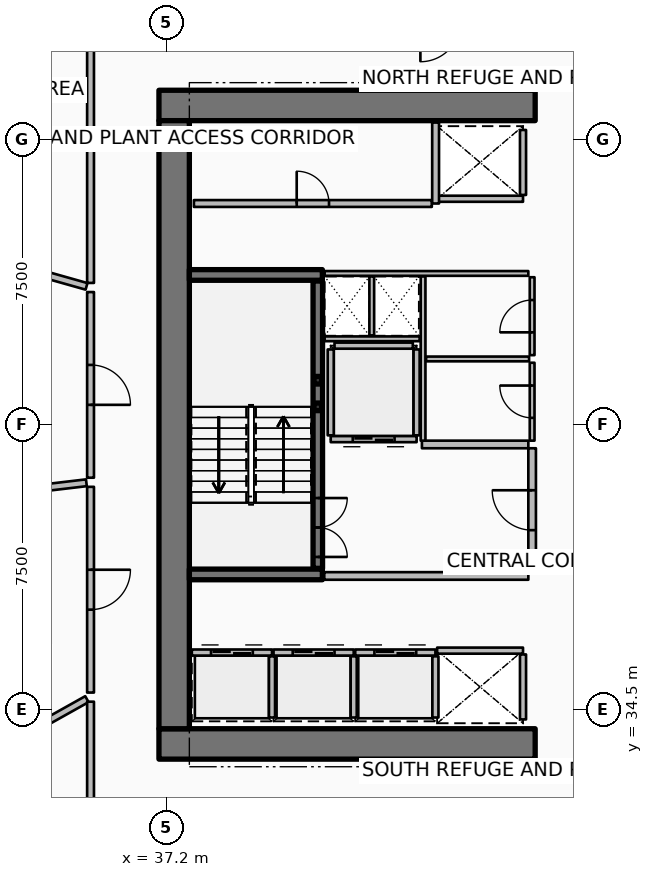
"""IFC4 building model, lengths in metres.
Left out: names, types, materials, properties, quantities, classifications, styles, units other than length and angle.
Written with IfcOpenShell. Run it as: python <this file> out.ifc"""

import sys

from ifc_helpers import new_model, si_unit, direction, frame, frame_2d, origin, origin_2d, place, context, subcontext, project, spatial, rectangle, hollow_rectangle, extrude, element, fill, save


model = new_model("IFC4")
c1 = context("Model", 3, precision=1e-05, world=origin(), true_north=direction((0.0, 1.0)))
c2 = subcontext(c1, "Body", "Model", "MODEL_VIEW")
j1 = project(units=[si_unit("LENGTHUNIT", "METRE"), si_unit("PLANEANGLEUNIT", "RADIAN")], contexts=[c1])
p1 = place(None, origin())
s1 = spatial("IfcSite", under=j1, at=p1, CompositionType="ELEMENT")
p2 = place(p1, origin())
s2 = spatial("IfcBuilding", under=s1, at=p2, CompositionType="ELEMENT")
p3 = place(p2, frame((0.0, 0.0, 116.4)))
s3 = spatial("IfcBuildingStorey", under=s2, at=p3, CompositionType="ELEMENT", Elevation=116.4)
for number, where, z_axis, x_axis in (
    (1, (37.0, 33.6, 0.0), (0.0, 0.0, 1.0), (1.0, 0.0, 0.0)),
    (2, (37.0, 50.4, 0.0), (0.0, 0.0, 1.0), (1.0, 0.0, 0.0)),
):
    element("IfcWall", number, at=place(p3, frame(where, z_axis=z_axis, x_axis=x_axis)), inside=s3, PredefinedType="SHEAR", context=c2, shape_type="SweptSolid", body=[
        extrude(rectangle(XDim=9.9, YDim=0.8, at=frame_2d((4.95, 0.0))), origin(), (0.0, 0.0, 1.0), 6.6),
    ])
p4 = place(p3, frame((37.4, 34.0, 0.0), z_axis=(0.0, 0.0, 1.0), x_axis=(0.0, 1.0, 0.0)))
e3 = element("IfcWall", 3, at=p4, inside=s3, PredefinedType="SHEAR", context=c2, shape_type="SweptSolid", body=[
    extrude(rectangle(XDim=16.0, YDim=0.8, at=frame_2d((8.0, 0.0))), origin(), (0.0, 0.0, 1.0), 6.6),
])
for number, where, z_axis, x_axis in (
    (4, (37.8, 38.06, 0.0), (0.0, 0.0, 1.0), (1.0, 0.0, 0.0)),
    (5, (37.8, 45.94, 0.0), (0.0, 0.0, 1.0), (1.0, 0.0, 0.0)),
):
    element("IfcWall", number, at=place(p3, frame(where, z_axis=z_axis, x_axis=x_axis)), inside=s3, PredefinedType="SHEAR", context=c2, shape_type="SweptSolid", body=[
        extrude(rectangle(XDim=3.5, YDim=0.28, at=frame_2d((1.75, 0.0))), origin(), (0.0, 0.0, 1.0), 6.6),
    ])
p5 = place(p3, frame((41.18, 42.47, 0.0), z_axis=(0.0, 0.0, 1.0), x_axis=(1.0, 0.0, 0.0)))
e6 = element("IfcColumn", 6, at=p5, inside=s3, PredefinedType="COLUMN", context=c2, shape_type="SweptSolid", body=[
    extrude(hollow_rectangle(XDim=0.2, YDim=0.2, WallThickness=0.01, InnerFilletRadius=0.01, OuterFilletRadius=0.02, at=origin_2d()), origin(), (0.0, 0.0, 1.0), 1.445),
])
p6 = place(p3, frame((41.18, 43.17, 0.0), z_axis=(0.0, 0.0, 1.0), x_axis=(1.0, 0.0, 0.0)))
e7 = element("IfcColumn", 7, at=p6, inside=s3, PredefinedType="COLUMN", context=c2, shape_type="SweptSolid", body=[
    extrude(hollow_rectangle(XDim=0.2, YDim=0.2, WallThickness=0.01, InnerFilletRadius=0.01, OuterFilletRadius=0.02, at=origin_2d()), origin(), (0.0, 0.0, 1.0), 4.745),
])
p7 = place(p3, frame((41.18, 38.22, 0.0), z_axis=(0.0, 0.0, 1.0), x_axis=(0.0, 1.0, 0.0)))
e8 = element("IfcWall", 8, at=p7, inside=s3, PredefinedType="SOLIDWALL", context=c2, shape_type="SweptSolid", body=[
    extrude(rectangle(XDim=7.56, YDim=0.25, at=frame_2d((3.78, 0.0))), origin(), (0.0, 0.0, 1.0), 6.28),
])
p8 = place(p7, frame((0.3, 0.0, 0.0)))
e9 = element("IfcOpeningElement", 9, at=p8, cuts=e8, PredefinedType="OPENING", context=c2, shape_type="SweptSolid", body=[
    extrude(rectangle(XDim=1.55, YDim=2.15, at=frame_2d((0.775, 1.075))), frame((0.0, 0.135, 0.0), z_axis=(0.0, -1.0, 0.0), x_axis=(1.0, 0.0, 0.0)), (0.0, 0.0, 1.0), 0.27),
])
p9 = place(p3, frame((37.865, 36.005, 0.0), z_axis=(0.0, 0.0, 1.0), x_axis=(1.0, 0.0, 0.0)))
e10 = element("IfcWall", 10, at=p9, inside=s3, PredefinedType="PARTITIONING", context=c2, shape_type="SweptSolid", body=[
    extrude(rectangle(XDim=2.11, YDim=0.16, at=frame_2d((1.055, 0.0))), origin(), (0.0, 0.0, 1.0), 6.28),
])
p10 = place(p9, frame((0.505, 0.0, 0.0)))
e11 = element("IfcOpeningElement", 11, at=p10, cuts=e10, PredefinedType="OPENING", context=c2, shape_type="SweptSolid", body=[
    extrude(rectangle(XDim=1.1, YDim=2.1, at=frame_2d((0.55, 1.05))), frame((0.0, 0.09, 0.0), z_axis=(0.0, -1.0, 0.0), x_axis=(1.0, 0.0, 0.0)), (0.0, 0.0, 1.0), 0.18),
])
p11 = place(p3, frame((39.975, 34.295, 0.0), z_axis=(0.0, 0.0, 1.0), x_axis=(0.0, 1.0, 0.0)))
e12 = element("IfcWall", 12, at=p11, inside=s3, PredefinedType="PARTITIONING", context=c2, shape_type="SweptSolid", body=[
    extrude(rectangle(XDim=1.61, YDim=0.16, at=frame_2d((0.805, 0.0))), origin(), (0.0, 0.0, 1.0), 6.28),
])
p12 = place(p3, frame((40.015, 36.005, 0.0), z_axis=(0.0, 0.0, 1.0), x_axis=(1.0, 0.0, 0.0)))
e13 = element("IfcWall", 13, at=p12, inside=s3, PredefinedType="PARTITIONING", context=c2, shape_type="SweptSolid", body=[
    extrude(rectangle(XDim=2.11, YDim=0.16, at=frame_2d((1.055, 0.0))), origin(), (0.0, 0.0, 1.0), 6.28),
])
p13 = place(p12, frame((0.505, 0.0, 0.0)))
e14 = element("IfcOpeningElement", 14, at=p13, cuts=e13, PredefinedType="OPENING", context=c2, shape_type="SweptSolid", body=[
    extrude(rectangle(XDim=1.1, YDim=2.1, at=frame_2d((0.55, 1.05))), frame((0.0, 0.09, 0.0), z_axis=(0.0, -1.0, 0.0), x_axis=(1.0, 0.0, 0.0)), (0.0, 0.0, 1.0), 0.18),
])
p14 = place(p3, frame((42.125, 34.295, 0.0), z_axis=(0.0, 0.0, 1.0), x_axis=(0.0, 1.0, 0.0)))
e15 = element("IfcWall", 15, at=p14, inside=s3, PredefinedType="PARTITIONING", context=c2, shape_type="SweptSolid", body=[
    extrude(rectangle(XDim=1.61, YDim=0.16, at=frame_2d((0.805, 0.0))), origin(), (0.0, 0.0, 1.0), 6.28),
])
p15 = place(p3, frame((42.165, 36.005, 0.0), z_axis=(0.0, 0.0, 1.0), x_axis=(1.0, 0.0, 0.0)))
e16 = element("IfcWall", 16, at=p15, inside=s3, PredefinedType="PARTITIONING", context=c2, shape_type="SweptSolid", body=[
    extrude(rectangle(XDim=2.11, YDim=0.16, at=frame_2d((1.055, 0.0))), origin(), (0.0, 0.0, 1.0), 6.28),
])
p16 = place(p15, frame((0.505, 0.0, 0.0)))
e17 = element("IfcOpeningElement", 17, at=p16, cuts=e16, PredefinedType="OPENING", context=c2, shape_type="SweptSolid", body=[
    extrude(rectangle(XDim=1.1, YDim=2.1, at=frame_2d((0.55, 1.05))), frame((0.0, 0.09, 0.0), z_axis=(0.0, -1.0, 0.0), x_axis=(1.0, 0.0, 0.0)), (0.0, 0.0, 1.0), 0.18),
])
p17 = place(p3, frame((44.275, 34.295, 0.0), z_axis=(0.0, 0.0, 1.0), x_axis=(0.0, 1.0, 0.0)))
e18 = element("IfcWall", 18, at=p17, inside=s3, PredefinedType="PARTITIONING", context=c2, shape_type="SweptSolid", body=[
    extrude(rectangle(XDim=1.61, YDim=0.16, at=frame_2d((0.805, 0.0))), origin(), (0.0, 0.0, 1.0), 6.28),
])
p18 = place(p3, frame((46.58, 47.945, 0.0), z_axis=(0.0, 0.0, 1.0), x_axis=(-1.0, 0.0, 0.0)))
e19 = element("IfcWall", 19, at=p18, inside=s3, PredefinedType="PARTITIONING", context=c2, shape_type="SweptSolid", body=[
    extrude(rectangle(XDim=2.26, YDim=0.16, at=frame_2d((1.13, 0.0))), origin(), (0.0, 0.0, 1.0), 6.28),
])
p19 = place(p3, frame((46.58, 48.045, 0.0), z_axis=(0.0, 0.0, 1.0), x_axis=(0.0, 1.0, 0.0)))
e20 = element("IfcWall", 20, at=p19, inside=s3, PredefinedType="PARTITIONING", context=c2, shape_type="SweptSolid", body=[
    extrude(rectangle(XDim=1.71, YDim=0.16, at=frame_2d((0.855, 0.0))), origin(), (0.0, 0.0, 1.0), 6.28),
])
p20 = place(p3, frame((44.32, 36.055, 0.0), z_axis=(0.0, 0.0, 1.0), x_axis=(1.0, 0.0, 0.0)))
e21 = element("IfcWall", 21, at=p20, inside=s3, PredefinedType="PARTITIONING", context=c2, shape_type="SweptSolid", body=[
    extrude(rectangle(XDim=2.26, YDim=0.16, at=frame_2d((1.13, 0.0))), origin(), (0.0, 0.0, 1.0), 6.28),
])
p21 = place(p3, frame((46.58, 34.245, 0.0), z_axis=(0.0, 0.0, 1.0), x_axis=(0.0, 1.0, 0.0)))
e22 = element("IfcWall", 22, at=p21, inside=s3, PredefinedType="PARTITIONING", context=c2, shape_type="SweptSolid", body=[
    extrude(rectangle(XDim=1.71, YDim=0.16, at=frame_2d((0.855, 0.0))), origin(), (0.0, 0.0, 1.0), 6.28),
])
p22 = place(p3, frame((43.78, 41.62, 0.0), z_axis=(0.0, 0.0, 1.0), x_axis=(-1.0, 0.0, 0.0)))
e23 = element("IfcWall", 23, at=p22, inside=s3, PredefinedType="PARTITIONING", context=c2, shape_type="SweptSolid", body=[
    extrude(rectangle(XDim=2.26, YDim=0.16, at=frame_2d((1.13, 0.0))), origin(), (0.0, 0.0, 1.0), 6.28),
])
p23 = place(p22, frame((0.58, 0.0, 0.0)))
e24 = element("IfcOpeningElement", 24, at=p23, cuts=e23, PredefinedType="OPENING", context=c2, shape_type="SweptSolid", body=[
    extrude(rectangle(XDim=1.1, YDim=2.1, at=frame_2d((0.55, 1.05))), frame((0.0, 0.09, 0.0), z_axis=(0.0, -1.0, 0.0), x_axis=(1.0, 0.0, 0.0)), (0.0, 0.0, 1.0), 0.18),
])
for number, where, z_axis, x_axis in (
    (25, (43.78, 41.72, 0.0), (0.0, 0.0, 1.0), (0.0, 1.0, 0.0)),
    (26, (41.52, 41.72, 0.0), (0.0, 0.0, 1.0), (0.0, 1.0, 0.0)),
):
    element("IfcWall", number, at=place(p3, frame(where, z_axis=z_axis, x_axis=x_axis)), inside=s3, PredefinedType="PARTITIONING", context=c2, shape_type="SweptSolid", body=[
        extrude(rectangle(XDim=2.26, YDim=0.16, at=frame_2d((1.13, 0.0))), origin(), (0.0, 0.0, 1.0), 6.28),
    ])
p24 = place(p3, frame((41.62, 44.08, 0.0), z_axis=(0.0, 0.0, 1.0), x_axis=(1.0, 0.0, 0.0)))
e27 = element("IfcWall", 27, at=p24, inside=s3, PredefinedType="PARTITIONING", context=c2, shape_type="SweptSolid", body=[
    extrude(rectangle(XDim=2.06, YDim=0.16, at=frame_2d((1.03, 0.0))), origin(), (0.0, 0.0, 1.0), 6.28),
])
p25 = place(p3, frame((37.92, 47.82, 0.0), z_axis=(0.0, 0.0, 1.0), x_axis=(1.0, 0.0, 0.0)))
e28 = element("IfcWall", 28, at=p25, inside=s3, PredefinedType="PARTITIONING", context=c2, shape_type="SweptSolid", body=[
    extrude(rectangle(XDim=6.26, YDim=0.18, at=frame_2d((3.13, 0.0))), origin(), (0.0, 0.0, 1.0), 6.28),
])
p26 = place(p25, frame((2.705, 0.0, 0.0)))
e29 = element("IfcOpeningElement", 29, at=p26, cuts=e28, PredefinedType="OPENING", context=c2, shape_type="SweptSolid", body=[
    extrude(rectangle(XDim=0.85, YDim=2.06, at=frame_2d((0.425, 1.03))), frame((0.0, 0.1, 0.0), z_axis=(0.0, -1.0, 0.0), x_axis=(1.0, 0.0, 0.0)), (0.0, 0.0, 1.0), 0.2),
])
p27 = place(p3, frame((44.28, 47.82, 0.0), z_axis=(0.0, 0.0, 1.0), x_axis=(0.0, 1.0, 0.0)))
e30 = element("IfcWall", 30, at=p27, inside=s3, PredefinedType="PARTITIONING", context=c2, shape_type="SweptSolid", body=[
    extrude(rectangle(XDim=2.13, YDim=0.18, at=frame_2d((1.065, 0.0))), origin(), (0.0, 0.0, 1.0), 6.28),
])
p28 = place(p3, frame((41.35, 38.02, 0.0), z_axis=(0.0, 0.0, 1.0), x_axis=(1.0, 0.0, 0.0)))
e31 = element("IfcWall", 31, at=p28, inside=s3, PredefinedType="PARTITIONING", context=c2, shape_type="SweptSolid", body=[
    extrude(rectangle(XDim=5.37, YDim=0.2, at=frame_2d((2.685, 0.0))), origin(), (0.0, 0.0, 1.0), 6.28),
])
p29 = place(p3, frame((43.92, 41.48, 0.0), z_axis=(0.0, 0.0, 1.0), x_axis=(1.0, 0.0, 0.0)))
e32 = element("IfcWall", 32, at=p29, inside=s3, PredefinedType="PARTITIONING", context=c2, shape_type="SweptSolid", body=[
    extrude(rectangle(XDim=2.8, YDim=0.2, at=frame_2d((1.4, 0.0))), origin(), (0.0, 0.0, 1.0), 6.28),
])
p30 = place(p3, frame((46.82, 38.12, 0.0), z_axis=(0.0, 0.0, 1.0), x_axis=(0.0, 1.0, 0.0)))
e33 = element("IfcWall", 33, at=p30, inside=s3, PredefinedType="PARTITIONING", context=c2, shape_type="SweptSolid", body=[
    extrude(rectangle(XDim=3.26, YDim=0.2, at=frame_2d((1.63, 0.0))), origin(), (0.0, 0.0, 1.0), 6.28),
])
p31 = place(p30, frame((1.105, 0.0, 0.0)))
e34 = element("IfcOpeningElement", 34, at=p31, cuts=e33, PredefinedType="OPENING", context=c2, shape_type="SweptSolid", body=[
    extrude(rectangle(XDim=1.05, YDim=2.1, at=frame_2d((0.525, 1.05))), frame((0.0, 0.11, 0.0), z_axis=(0.0, -1.0, 0.0), x_axis=(1.0, 0.0, 0.0)), (0.0, 0.0, 1.0), 0.22),
])
p32 = place(p3, frame((41.36, 45.98, 0.0), z_axis=(0.0, 0.0, 1.0), x_axis=(1.0, 0.0, 0.0)))
e35 = element("IfcWall", 35, at=p32, inside=s3, PredefinedType="PARTITIONING", context=c2, shape_type="SweptSolid", body=[
    extrude(rectangle(XDim=5.36, YDim=0.125, at=frame_2d((2.68, 0.0))), origin(), (0.0, 0.0, 1.0), 5.72),
])
p33 = place(p3, frame((41.36, 44.26, 0.0), z_axis=(0.0, 0.0, 1.0), x_axis=(1.0, 0.0, 0.0)))
e36 = element("IfcWall", 36, at=p33, inside=s3, PredefinedType="PARTITIONING", context=c2, shape_type="SweptSolid", body=[
    extrude(rectangle(XDim=2.5, YDim=0.125, at=frame_2d((1.25, 0.0))), origin(), (0.0, 0.0, 1.0), 5.72),
])
p34 = place(p3, frame((42.6, 44.35, 0.0), z_axis=(0.0, 0.0, 1.0), x_axis=(0.0, 1.0, 0.0)))
e37 = element("IfcWall", 37, at=p34, inside=s3, PredefinedType="PARTITIONING", context=c2, shape_type="SweptSolid", body=[
    extrude(rectangle(XDim=1.55, YDim=0.125, at=frame_2d((0.775, 0.0))), origin(), (0.0, 0.0, 1.0), 5.72),
])
p35 = place(p3, frame((43.95, 41.58, 0.0), z_axis=(0.0, 0.0, 1.0), x_axis=(0.0, 1.0, 0.0)))
e38 = element("IfcWall", 38, at=p35, inside=s3, PredefinedType="PARTITIONING", context=c2, shape_type="SweptSolid", body=[
    extrude(rectangle(XDim=4.32, YDim=0.125, at=frame_2d((2.16, 0.0))), origin(), (0.0, 0.0, 1.0), 5.72),
])
p36 = place(p3, frame((44.03, 43.73, 0.0), z_axis=(0.0, 0.0, 1.0), x_axis=(1.0, 0.0, 0.0)))
e39 = element("IfcWall", 39, at=p36, inside=s3, PredefinedType="PARTITIONING", context=c2, shape_type="SweptSolid", body=[
    extrude(rectangle(XDim=2.71, YDim=0.125, at=frame_2d((1.355, 0.0))), origin(), (0.0, 0.0, 1.0), 5.72),
])
p37 = place(p3, frame((46.82, 41.58, 0.0), z_axis=(0.0, 0.0, 1.0), x_axis=(0.0, 1.0, 0.0)))
e40 = element("IfcWall", 40, at=p37, inside=s3, PredefinedType="PARTITIONING", context=c2, shape_type="SweptSolid", body=[
    extrude(rectangle(XDim=2.05, YDim=0.125, at=frame_2d((1.025, 0.0))), origin(), (0.0, 0.0, 1.0), 5.72),
])
p38 = place(p37, frame((0.6, 0.0, 0.0)))
e41 = element("IfcOpeningElement", 41, at=p38, cuts=e40, PredefinedType="OPENING", context=c2, shape_type="SweptSolid", body=[
    extrude(rectangle(XDim=0.85, YDim=2.06, at=frame_2d((0.425, 1.03))), frame((0.0, 0.073, 0.0), z_axis=(0.0, -1.0, 0.0), x_axis=(1.0, 0.0, 0.0)), (0.0, 0.0, 1.0), 0.145),
])
p39 = place(p3, frame((46.82, 43.83, 0.0), z_axis=(0.0, 0.0, 1.0), x_axis=(0.0, 1.0, 0.0)))
e42 = element("IfcWall", 42, at=p39, inside=s3, PredefinedType="PARTITIONING", context=c2, shape_type="SweptSolid", body=[
    extrude(rectangle(XDim=2.05, YDim=0.125, at=frame_2d((1.025, 0.0))), origin(), (0.0, 0.0, 1.0), 5.72),
])
p40 = place(p39, frame((0.6, 0.0, 0.0)))
e43 = element("IfcOpeningElement", 43, at=p40, cuts=e42, PredefinedType="OPENING", context=c2, shape_type="SweptSolid", body=[
    extrude(rectangle(XDim=0.85, YDim=2.06, at=frame_2d((0.425, 1.03))), frame((0.0, 0.073, 0.0), z_axis=(0.0, -1.0, 0.0), x_axis=(1.0, 0.0, 0.0)), (0.0, 0.0, 1.0), 0.145),
])
p41 = place(p3, frame((35.2, 51.971, 0.0), z_axis=(0.0, 0.0, 1.0), x_axis=(0.0, -1.0, 0.0)))
e44 = element("IfcWall", 44, at=p41, inside=s3, PredefinedType="PARTITIONING", context=c2, shape_type="SweptSolid", body=[
    extrude(rectangle(XDim=6.241, YDim=0.18, at=frame_2d((3.12, 0.0))), origin(), (0.0, 0.0, 1.0), 2.304),
])
p42 = place(p3, frame((35.094, 45.64, 0.0), z_axis=(0.0, 0.0, 1.0), x_axis=(-0.962454179432, 0.271444197754, 0.0)))
e45 = element("IfcWall", 45, at=p42, inside=s3, PredefinedType="PARTITIONING", context=c2, shape_type="SweptSolid", body=[
    extrude(rectangle(XDim=9.805, YDim=0.18, at=frame_2d((4.903, 0.0))), origin(), (0.0, 0.0, 1.0), 2.304),
])
p43 = place(p3, frame((35.2, 45.49, 0.0), z_axis=(0.0, 0.0, 1.0), x_axis=(0.0, -1.0, 0.0)))
e46 = element("IfcWall", 46, at=p43, inside=s3, PredefinedType="PARTITIONING", context=c2, shape_type="SweptSolid", body=[
    extrude(rectangle(XDim=4.885, YDim=0.18, at=frame_2d((2.442, 0.0))), origin(), (0.0, 0.0, 1.0), 2.304),
])
p44 = place(p43, frame((1.917, 0.0, 0.0)))
e47 = element("IfcOpeningElement", 47, at=p44, cuts=e46, PredefinedType="OPENING", context=c2, shape_type="SweptSolid", body=[
    extrude(rectangle(XDim=1.05, YDim=2.1, at=frame_2d((0.525, 1.05))), frame((0.0, 0.1, 0.0), z_axis=(0.0, -1.0, 0.0), x_axis=(1.0, 0.0, 0.0)), (0.0, 0.0, 1.0), 0.2),
])
p45 = place(p3, frame((35.091, 40.472, 0.0), z_axis=(0.0, 0.0, 1.0), x_axis=(-0.993067224792, -0.117547807482, 0.0)))
e48 = element("IfcWall", 48, at=p45, inside=s3, PredefinedType="PARTITIONING", context=c2, shape_type="SweptSolid", body=[
    extrude(rectangle(XDim=11.126, YDim=0.18, at=frame_2d((5.563, 0.0))), origin(), (0.0, 0.0, 1.0), 5.273),
])
p46 = place(p3, frame((35.2, 40.365, 0.0), z_axis=(0.0, 0.0, 1.0), x_axis=(0.0, -1.0, 0.0)))
e49 = element("IfcWall", 49, at=p46, inside=s3, PredefinedType="PARTITIONING", context=c2, shape_type="SweptSolid", body=[
    extrude(rectangle(XDim=5.413, YDim=0.18, at=frame_2d((2.707, 0.0))), origin(), (0.0, 0.0, 1.0), 5.273),
])
p47 = place(p46, frame((2.182, 0.0, 0.0)))
e50 = element("IfcOpeningElement", 50, at=p47, cuts=e49, PredefinedType="OPENING", context=c2, shape_type="SweptSolid", body=[
    extrude(rectangle(XDim=1.05, YDim=2.1, at=frame_2d((0.525, 1.05))), frame((0.0, 0.1, 0.0), z_axis=(0.0, -1.0, 0.0), x_axis=(1.0, 0.0, 0.0)), (0.0, 0.0, 1.0), 0.2),
])
p48 = place(p3, frame((35.104, 34.778, 0.0), z_axis=(0.0, 0.0, 1.0), x_axis=(-0.872492204965, -0.488628030586, 0.0)))
e51 = element("IfcWall", 51, at=p48, inside=s3, PredefinedType="PARTITIONING", context=c2, shape_type="SweptSolid", body=[
    extrude(rectangle(XDim=9.345, YDim=0.18, at=frame_2d((4.672, 0.0))), origin(), (0.0, 0.0, 1.0), 5.273),
])
p49 = place(p3, frame((35.2, 34.712, 0.0), z_axis=(0.0, 0.0, 1.0), x_axis=(0.0, -1.0, 0.0)))
e52 = element("IfcWall", 52, at=p49, inside=s3, PredefinedType="PARTITIONING", context=c2, shape_type="SweptSolid", body=[
    extrude(rectangle(XDim=3.192, YDim=0.18, at=frame_2d((1.596, 0.0))), origin(), (0.0, 0.0, 1.0), 5.273),
])
p50 = place(p8, origin())
e53 = element("IfcDoor", 53, at=p50, inside=s3, OperationType="DOUBLE_DOOR_SINGLE_SWING", PredefinedType="DOOR", context=c2, shape_type="SweptSolid", body=[
    extrude(rectangle(XDim=1.55, YDim=2.15, at=frame_2d((0.775, 1.075))), frame((0.0, 0.025, 0.0), z_axis=(0.0, -1.0, 0.0), x_axis=(1.0, 0.0, 0.0)), (0.0, 0.0, 1.0), 0.05),
])
fill(e9, e53)
p51 = place(p10, origin())
e54 = element("IfcDoor", 54, at=p51, inside=s3, OperationType="DOUBLE_DOOR_SLIDING", PredefinedType="DOOR", context=c2, shape_type="SweptSolid", body=[
    extrude(rectangle(XDim=1.1, YDim=2.1, at=frame_2d((0.55, 1.05))), frame((0.0, 0.025, 0.0), z_axis=(0.0, -1.0, 0.0), x_axis=(1.0, 0.0, 0.0)), (0.0, 0.0, 1.0), 0.05),
])
fill(e11, e54)
p52 = place(p13, origin())
e55 = element("IfcDoor", 55, at=p52, inside=s3, OperationType="DOUBLE_DOOR_SLIDING", PredefinedType="DOOR", context=c2, shape_type="SweptSolid", body=[
    extrude(rectangle(XDim=1.1, YDim=2.1, at=frame_2d((0.55, 1.05))), frame((0.0, 0.025, 0.0), z_axis=(0.0, -1.0, 0.0), x_axis=(1.0, 0.0, 0.0)), (0.0, 0.0, 1.0), 0.05),
])
fill(e14, e55)
p53 = place(p16, origin())
e56 = element("IfcDoor", 56, at=p53, inside=s3, OperationType="DOUBLE_DOOR_SLIDING", PredefinedType="DOOR", context=c2, shape_type="SweptSolid", body=[
    extrude(rectangle(XDim=1.1, YDim=2.1, at=frame_2d((0.55, 1.05))), frame((0.0, 0.025, 0.0), z_axis=(0.0, -1.0, 0.0), x_axis=(1.0, 0.0, 0.0)), (0.0, 0.0, 1.0), 0.05),
])
fill(e17, e56)
p54 = place(p23, origin())
e57 = element("IfcDoor", 57, at=p54, inside=s3, OperationType="DOUBLE_DOOR_SLIDING", PredefinedType="DOOR", context=c2, shape_type="SweptSolid", body=[
    extrude(rectangle(XDim=1.1, YDim=2.1, at=frame_2d((0.55, 1.05))), frame((0.0, 0.025, 0.0), z_axis=(0.0, -1.0, 0.0), x_axis=(1.0, 0.0, 0.0)), (0.0, 0.0, 1.0), 0.05),
])
fill(e24, e57)
p55 = place(p26, origin())
e58 = element("IfcDoor", 58, at=p55, inside=s3, OperationType="SINGLE_SWING_LEFT", PredefinedType="DOOR", context=c2, shape_type="SweptSolid", body=[
    extrude(rectangle(XDim=0.85, YDim=2.06, at=frame_2d((0.425, 1.03))), frame((0.0, 0.025, 0.0), z_axis=(0.0, -1.0, 0.0), x_axis=(1.0, 0.0, 0.0)), (0.0, 0.0, 1.0), 0.05),
])
fill(e29, e58)
p56 = place(p31, origin())
e59 = element("IfcDoor", 59, at=p56, inside=s3, OperationType="SINGLE_SWING_RIGHT", PredefinedType="DOOR", context=c2, shape_type="SweptSolid", body=[
    extrude(rectangle(XDim=1.05, YDim=2.1, at=frame_2d((0.525, 1.05))), frame((0.0, 0.025, 0.0), z_axis=(0.0, -1.0, 0.0), x_axis=(1.0, 0.0, 0.0)), (0.0, 0.0, 1.0), 0.05),
])
fill(e34, e59)
p57 = place(p38, origin())
e60 = element("IfcDoor", 60, at=p57, inside=s3, OperationType="SINGLE_SWING_RIGHT", PredefinedType="DOOR", context=c2, shape_type="SweptSolid", body=[
    extrude(rectangle(XDim=0.85, YDim=2.06, at=frame_2d((0.425, 1.03))), frame((0.0, 0.025, 0.0), z_axis=(0.0, -1.0, 0.0), x_axis=(1.0, 0.0, 0.0)), (0.0, 0.0, 1.0), 0.05),
])
fill(e41, e60)
p58 = place(p40, origin())
e61 = element("IfcDoor", 61, at=p58, inside=s3, OperationType="SINGLE_SWING_LEFT", PredefinedType="DOOR", context=c2, shape_type="SweptSolid", body=[
    extrude(rectangle(XDim=0.85, YDim=2.06, at=frame_2d((0.425, 1.03))), frame((0.0, 0.025, 0.0), z_axis=(0.0, -1.0, 0.0), x_axis=(1.0, 0.0, 0.0)), (0.0, 0.0, 1.0), 0.05),
])
fill(e43, e61)
p59 = place(p44, origin())
e62 = element("IfcDoor", 62, at=p59, inside=s3, OperationType="SINGLE_SWING_RIGHT", PredefinedType="DOOR", context=c2, shape_type="SweptSolid", body=[
    extrude(rectangle(XDim=1.05, YDim=2.1, at=frame_2d((0.525, 1.05))), frame((0.0, 0.025, 0.0), z_axis=(0.0, -1.0, 0.0), x_axis=(1.0, 0.0, 0.0)), (0.0, 0.0, 1.0), 0.05),
])
fill(e47, e62)
p60 = place(p47, origin())
e63 = element("IfcDoor", 63, at=p60, inside=s3, OperationType="SINGLE_SWING_LEFT", PredefinedType="DOOR", context=c2, shape_type="SweptSolid", body=[
    extrude(rectangle(XDim=1.05, YDim=2.1, at=frame_2d((0.525, 1.05))), frame((0.0, 0.025, 0.0), z_axis=(0.0, -1.0, 0.0), x_axis=(1.0, 0.0, 0.0)), (0.0, 0.0, 1.0), 0.05),
])
fill(e50, e63)
save(model, sys.argv[1])
